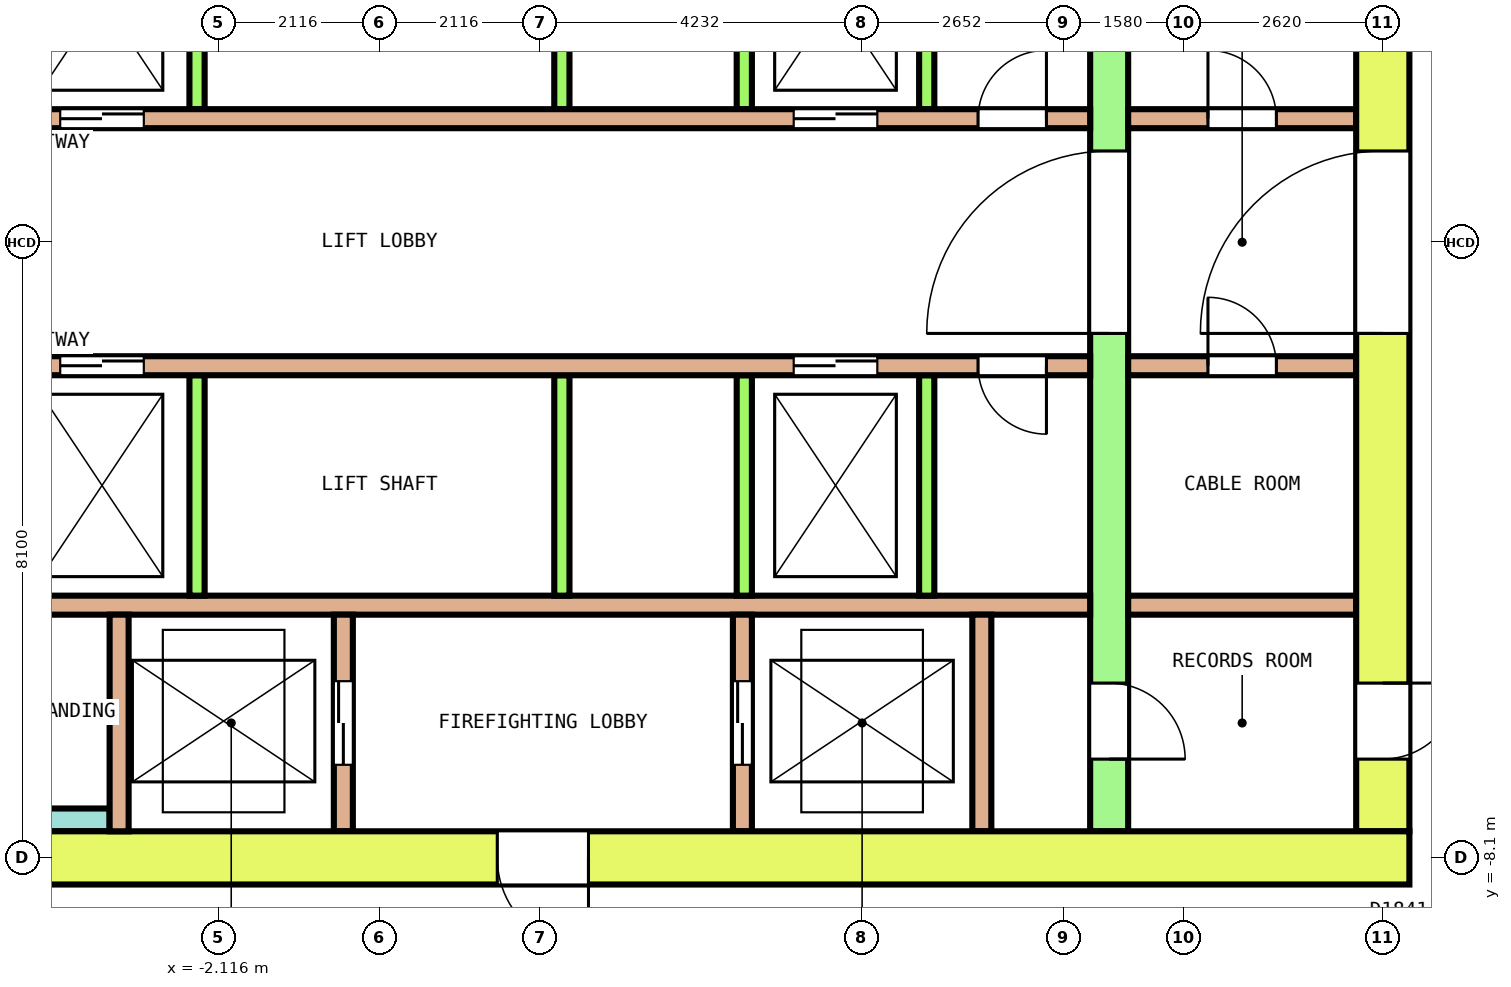
"""IFC4 building model, lengths in metres.
Left out: names, types, materials, properties, quantities, classifications, styles, units other than length and angle.
Written with IfcOpenShell. Run it as: python <this file> out.ifc"""

import sys

from ifc_helpers import new_model, si_unit, direction, frame, frame_2d, origin, place, context, subcontext, project, spatial, rectangle, extrude, element, fill, save


model = new_model("IFC4")
c1 = context("Model", 3, precision=1e-05, world=origin(), true_north=direction((0.0, 1.0)))
c2 = subcontext(c1, "Body", "Model", "MODEL_VIEW")
j1 = project(units=[si_unit("LENGTHUNIT", "METRE"), si_unit("PLANEANGLEUNIT", "RADIAN")], contexts=[c1])
p1 = place(None, origin())
s1 = spatial("IfcSite", under=j1, at=p1, CompositionType="ELEMENT")
p2 = place(p1, origin())
s2 = spatial("IfcBuilding", under=s1, at=p2, CompositionType="ELEMENT")
p3 = place(p2, frame((0.0, 0.0, 176.0)))
s3 = spatial("IfcBuildingStorey", under=s2, at=p3, CompositionType="ELEMENT", Elevation=176.0)
p4 = place(p3, frame((-13.55, -8.1, 0.0), z_axis=(0.0, 0.0, 1.0), x_axis=(1.0, 0.0, 0.0)))
e1 = element("IfcWall", 1, at=p4, inside=s3, PredefinedType="SHEAR", context=c2, shape_type="SweptSolid", body=[
    extrude(rectangle(XDim=27.1, YDim=0.7, at=frame_2d((13.55, 0.0))), origin(), (0.0, 0.0, 1.0), 4.1),
])
p5 = place(p4, frame((15.1, 0.0, 0.0)))
e2 = element("IfcOpeningElement", 2, at=p5, cuts=e1, PredefinedType="OPENING", context=c2, shape_type="SweptSolid", body=[
    extrude(rectangle(XDim=1.2, YDim=2.1, at=frame_2d((0.6, 1.05))), frame((0.0, 0.36, 0.0), z_axis=(0.0, -1.0, 0.0), x_axis=(1.0, 0.0, 0.0)), (0.0, 0.0, 1.0), 0.72),
])
p6 = place(p3, frame((13.2, -7.75, 0.0), z_axis=(0.0, 0.0, 1.0), x_axis=(0.0, 1.0, 0.0)))
e3 = element("IfcWall", 3, at=p6, inside=s3, PredefinedType="SHEAR", context=c2, shape_type="SweptSolid", body=[
    extrude(rectangle(XDim=15.5, YDim=0.7, at=frame_2d((7.75, 0.0))), origin(), (0.0, 0.0, 1.0), 4.1),
])
p7 = place(p6, frame((6.55, 0.0, 0.0)))
e4 = element("IfcOpeningElement", 4, at=p7, cuts=e3, PredefinedType="OPENING", context=c2, shape_type="SweptSolid", body=[
    extrude(rectangle(XDim=2.4, YDim=2.1, at=frame_2d((1.2, 1.05))), frame((0.0, 0.36, 0.0), z_axis=(0.0, -1.0, 0.0), x_axis=(1.0, 0.0, 0.0)), (0.0, 0.0, 1.0), 0.72),
])
p8 = place(p6, frame((13.45, 0.0, 0.0)))
e5 = element("IfcOpeningElement", 5, at=p8, cuts=e3, PredefinedType="OPENING", context=c2, shape_type="SweptSolid", body=[
    extrude(rectangle(XDim=1.2, YDim=2.1, at=frame_2d((0.6, 1.05))), frame((0.0, 0.36, 0.0), z_axis=(0.0, -1.0, 0.0), x_axis=(1.0, 0.0, 0.0)), (0.0, 0.0, 1.0), 0.72),
])
p9 = place(p6, frame((0.95, 0.0, 0.0)))
e6 = element("IfcOpeningElement", 6, at=p9, cuts=e3, PredefinedType="OPENING", context=c2, shape_type="SweptSolid", body=[
    extrude(rectangle(XDim=1.0, YDim=2.1, at=frame_2d((0.5, 1.05))), frame((0.0, 0.36, 0.0), z_axis=(0.0, -1.0, 0.0), x_axis=(1.0, 0.0, 0.0)), (0.0, 0.0, 1.0), 0.72),
])
p10 = place(p3, frame((9.6, -7.75, 0.0), z_axis=(0.0, 0.0, 1.0), x_axis=(0.0, 1.0, 0.0)))
e7 = element("IfcWall", 7, at=p10, inside=s3, PredefinedType="SHEAR", context=c2, shape_type="SweptSolid", body=[
    extrude(rectangle(XDim=15.5, YDim=0.5, at=frame_2d((7.75, 0.0))), origin(), (0.0, 0.0, 1.0), 4.1),
])
p11 = place(p10, frame((6.55, 0.0, 0.0)))
e8 = element("IfcOpeningElement", 8, at=p11, cuts=e7, PredefinedType="OPENING", context=c2, shape_type="SweptSolid", body=[
    extrude(rectangle(XDim=2.4, YDim=2.1, at=frame_2d((1.2, 1.05))), frame((0.0, 0.26, 0.0), z_axis=(0.0, -1.0, 0.0), x_axis=(1.0, 0.0, 0.0)), (0.0, 0.0, 1.0), 0.52),
])
p12 = place(p10, frame((13.45, 0.0, 0.0)))
e9 = element("IfcOpeningElement", 9, at=p12, cuts=e7, PredefinedType="OPENING", context=c2, shape_type="SweptSolid", body=[
    extrude(rectangle(XDim=1.2, YDim=2.1, at=frame_2d((0.6, 1.05))), frame((0.0, 0.26, 0.0), z_axis=(0.0, -1.0, 0.0), x_axis=(1.0, 0.0, 0.0)), (0.0, 0.0, 1.0), 0.52),
])
p13 = place(p10, frame((0.95, 0.0, 0.0)))
e10 = element("IfcOpeningElement", 10, at=p13, cuts=e7, PredefinedType="OPENING", context=c2, shape_type="SweptSolid", body=[
    extrude(rectangle(XDim=1.0, YDim=2.1, at=frame_2d((0.5, 1.05))), frame((0.0, 0.26, 0.0), z_axis=(0.0, -1.0, 0.0), x_axis=(1.0, 0.0, 0.0)), (0.0, 0.0, 1.0), 0.52),
])
p14 = place(p3, frame((-9.35, 1.625, 0.0), z_axis=(0.0, 0.0, 1.0), x_axis=(1.0, 0.0, 0.0)))
e11 = element("IfcWall", 11, at=p14, inside=s3, PredefinedType="SOLIDWALL", context=c2, shape_type="SweptSolid", body=[
    extrude(rectangle(XDim=18.7, YDim=0.25, at=frame_2d((9.35, 0.0))), origin(), (0.0, 0.0, 1.0), 4.1),
])
p15 = place(p14, frame((2.85, 0.0, 0.0)))
e12 = element("IfcOpeningElement", 12, at=p15, cuts=e11, PredefinedType="OPENING", context=c2, shape_type="SweptSolid", body=[
    extrude(rectangle(XDim=1.1, YDim=2.1, at=frame_2d((0.55, 1.05))), frame((0.0, 0.135, 0.0), z_axis=(0.0, -1.0, 0.0), x_axis=(1.0, 0.0, 0.0)), (0.0, 0.0, 1.0), 0.27),
])
p16 = place(p14, frame((5.15, 0.0, 0.0)))
e13 = element("IfcOpeningElement", 13, at=p16, cuts=e11, PredefinedType="OPENING", context=c2, shape_type="SweptSolid", body=[
    extrude(rectangle(XDim=1.1, YDim=2.1, at=frame_2d((0.55, 1.05))), frame((0.0, 0.135, 0.0), z_axis=(0.0, -1.0, 0.0), x_axis=(1.0, 0.0, 0.0)), (0.0, 0.0, 1.0), 0.27),
])
p17 = place(p14, frame((14.8, 0.0, 0.0)))
e14 = element("IfcOpeningElement", 14, at=p17, cuts=e11, PredefinedType="OPENING", context=c2, shape_type="SweptSolid", body=[
    extrude(rectangle(XDim=1.1, YDim=2.1, at=frame_2d((0.55, 1.05))), frame((0.0, 0.135, 0.0), z_axis=(0.0, -1.0, 0.0), x_axis=(1.0, 0.0, 0.0)), (0.0, 0.0, 1.0), 0.27),
])
p18 = place(p14, frame((0.575, 0.0, 0.0)))
e15 = element("IfcOpeningElement", 15, at=p18, cuts=e11, PredefinedType="OPENING", context=c2, shape_type="SweptSolid", body=[
    extrude(rectangle(XDim=0.9, YDim=2.1, at=frame_2d((0.45, 1.05))), frame((0.0, 0.135, 0.0), z_axis=(0.0, -1.0, 0.0), x_axis=(1.0, 0.0, 0.0)), (0.0, 0.0, 1.0), 0.27),
])
p19 = place(p14, frame((17.225, 0.0, 0.0)))
e16 = element("IfcOpeningElement", 16, at=p19, cuts=e11, PredefinedType="OPENING", context=c2, shape_type="SweptSolid", body=[
    extrude(rectangle(XDim=0.9, YDim=2.1, at=frame_2d((0.45, 1.05))), frame((0.0, 0.135, 0.0), z_axis=(0.0, -1.0, 0.0), x_axis=(1.0, 0.0, 0.0)), (0.0, 0.0, 1.0), 0.27),
])
p20 = place(p3, frame((9.85, 1.625, 0.0), z_axis=(0.0, 0.0, 1.0), x_axis=(1.0, 0.0, 0.0)))
e17 = element("IfcWall", 17, at=p20, inside=s3, PredefinedType="SOLIDWALL", context=c2, shape_type="SweptSolid", body=[
    extrude(rectangle(XDim=3.0, YDim=0.25, at=frame_2d((1.5, 0.0))), origin(), (0.0, 0.0, 1.0), 4.1),
])
p21 = place(p20, frame((1.05, 0.0, 0.0)))
e18 = element("IfcOpeningElement", 18, at=p21, cuts=e17, PredefinedType="OPENING", context=c2, shape_type="SweptSolid", body=[
    extrude(rectangle(XDim=0.9, YDim=2.1, at=frame_2d((0.45, 1.05))), frame((0.0, 0.135, 0.0), z_axis=(0.0, -1.0, 0.0), x_axis=(1.0, 0.0, 0.0)), (0.0, 0.0, 1.0), 0.27),
])
for number, where, z_axis, x_axis in (
    (19, (-2.4, 1.75, 0.0), (0.0, 0.0, 1.0), (0.0, 1.0, 0.0)),
    (20, (2.4, 1.75, 0.0), (0.0, 0.0, 1.0), (0.0, 1.0, 0.0)),
    (21, (4.8, 1.75, 0.0), (0.0, 0.0, 1.0), (0.0, 1.0, 0.0)),
    (22, (7.2, 1.75, 0.0), (0.0, 0.0, 1.0), (0.0, 1.0, 0.0)),
):
    element("IfcWall", number, at=place(p3, frame(where, z_axis=z_axis, x_axis=x_axis)), inside=s3, PredefinedType="SOLIDWALL", context=c2, shape_type="SweptSolid", body=[
        extrude(rectangle(XDim=2.9, YDim=0.2, at=frame_2d((1.45, 0.0))), origin(), (0.0, 0.0, 1.0), 4.1),
    ])
p22 = place(p3, frame((-9.35, -1.625, 0.0), z_axis=(0.0, 0.0, 1.0), x_axis=(1.0, 0.0, 0.0)))
e23 = element("IfcWall", 23, at=p22, inside=s3, PredefinedType="SOLIDWALL", context=c2, shape_type="SweptSolid", body=[
    extrude(rectangle(XDim=18.7, YDim=0.25, at=frame_2d((9.35, 0.0))), origin(), (0.0, 0.0, 1.0), 4.1),
])
p23 = place(p22, frame((2.85, 0.0, 0.0)))
e24 = element("IfcOpeningElement", 24, at=p23, cuts=e23, PredefinedType="OPENING", context=c2, shape_type="SweptSolid", body=[
    extrude(rectangle(XDim=1.1, YDim=2.1, at=frame_2d((0.55, 1.05))), frame((0.0, 0.135, 0.0), z_axis=(0.0, -1.0, 0.0), x_axis=(1.0, 0.0, 0.0)), (0.0, 0.0, 1.0), 0.27),
])
p24 = place(p22, frame((5.15, 0.0, 0.0)))
e25 = element("IfcOpeningElement", 25, at=p24, cuts=e23, PredefinedType="OPENING", context=c2, shape_type="SweptSolid", body=[
    extrude(rectangle(XDim=1.1, YDim=2.1, at=frame_2d((0.55, 1.05))), frame((0.0, 0.135, 0.0), z_axis=(0.0, -1.0, 0.0), x_axis=(1.0, 0.0, 0.0)), (0.0, 0.0, 1.0), 0.27),
])
p25 = place(p22, frame((14.8, 0.0, 0.0)))
e26 = element("IfcOpeningElement", 26, at=p25, cuts=e23, PredefinedType="OPENING", context=c2, shape_type="SweptSolid", body=[
    extrude(rectangle(XDim=1.1, YDim=2.1, at=frame_2d((0.55, 1.05))), frame((0.0, 0.135, 0.0), z_axis=(0.0, -1.0, 0.0), x_axis=(1.0, 0.0, 0.0)), (0.0, 0.0, 1.0), 0.27),
])
p26 = place(p22, frame((0.575, 0.0, 0.0)))
e27 = element("IfcOpeningElement", 27, at=p26, cuts=e23, PredefinedType="OPENING", context=c2, shape_type="SweptSolid", body=[
    extrude(rectangle(XDim=0.9, YDim=2.1, at=frame_2d((0.45, 1.05))), frame((0.0, 0.135, 0.0), z_axis=(0.0, -1.0, 0.0), x_axis=(1.0, 0.0, 0.0)), (0.0, 0.0, 1.0), 0.27),
])
p27 = place(p22, frame((17.225, 0.0, 0.0)))
e28 = element("IfcOpeningElement", 28, at=p27, cuts=e23, PredefinedType="OPENING", context=c2, shape_type="SweptSolid", body=[
    extrude(rectangle(XDim=0.9, YDim=2.1, at=frame_2d((0.45, 1.05))), frame((0.0, 0.135, 0.0), z_axis=(0.0, -1.0, 0.0), x_axis=(1.0, 0.0, 0.0)), (0.0, 0.0, 1.0), 0.27),
])
p28 = place(p3, frame((9.85, -1.625, 0.0), z_axis=(0.0, 0.0, 1.0), x_axis=(1.0, 0.0, 0.0)))
e29 = element("IfcWall", 29, at=p28, inside=s3, PredefinedType="SOLIDWALL", context=c2, shape_type="SweptSolid", body=[
    extrude(rectangle(XDim=3.0, YDim=0.25, at=frame_2d((1.5, 0.0))), origin(), (0.0, 0.0, 1.0), 4.1),
])
p29 = place(p28, frame((1.05, 0.0, 0.0)))
e30 = element("IfcOpeningElement", 30, at=p29, cuts=e29, PredefinedType="OPENING", context=c2, shape_type="SweptSolid", body=[
    extrude(rectangle(XDim=0.9, YDim=2.1, at=frame_2d((0.45, 1.05))), frame((0.0, 0.135, 0.0), z_axis=(0.0, -1.0, 0.0), x_axis=(1.0, 0.0, 0.0)), (0.0, 0.0, 1.0), 0.27),
])
p30 = place(p3, frame((-9.35, -4.775, 0.0), z_axis=(0.0, 0.0, 1.0), x_axis=(1.0, 0.0, 0.0)))
e31 = element("IfcWall", 31, at=p30, inside=s3, PredefinedType="SOLIDWALL", context=c2, shape_type="SweptSolid", body=[
    extrude(rectangle(XDim=18.7, YDim=0.25, at=frame_2d((9.35, 0.0))), origin(), (0.0, 0.0, 1.0), 4.1),
])
p31 = place(p3, frame((9.85, -4.775, 0.0), z_axis=(0.0, 0.0, 1.0), x_axis=(1.0, 0.0, 0.0)))
e32 = element("IfcWall", 32, at=p31, inside=s3, PredefinedType="SOLIDWALL", context=c2, shape_type="SweptSolid", body=[
    extrude(rectangle(XDim=3.0, YDim=0.25, at=frame_2d((1.5, 0.0))), origin(), (0.0, 0.0, 1.0), 4.1),
])
for number, where, z_axis, x_axis in (
    (33, (-2.4, -4.65, 0.0), (0.0, 0.0, 1.0), (0.0, 1.0, 0.0)),
    (34, (2.4, -4.65, 0.0), (0.0, 0.0, 1.0), (0.0, 1.0, 0.0)),
    (35, (4.8, -4.65, 0.0), (0.0, 0.0, 1.0), (0.0, 1.0, 0.0)),
    (36, (7.2, -4.65, 0.0), (0.0, 0.0, 1.0), (0.0, 1.0, 0.0)),
):
    element("IfcWall", number, at=place(p3, frame(where, z_axis=z_axis, x_axis=x_axis)), inside=s3, PredefinedType="SOLIDWALL", context=c2, shape_type="SweptSolid", body=[
        extrude(rectangle(XDim=2.9, YDim=0.2, at=frame_2d((1.45, 0.0))), origin(), (0.0, 0.0, 1.0), 4.1),
    ])
p32 = place(p3, frame((-9.35, -7.6, 0.0), z_axis=(0.0, 0.0, 1.0), x_axis=(1.0, 0.0, 0.0)))
e37 = element("IfcWall", 37, at=p32, inside=s3, PredefinedType="SOLIDWALL", context=c2, shape_type="SweptSolid", body=[
    extrude(rectangle(XDim=5.8, YDim=0.3, at=frame_2d((2.9, 0.0))), origin(), (0.0, 0.0, 1.0), 4.1),
])
p33 = place(p3, frame((-3.425, -7.75, 0.0), z_axis=(0.0, 0.0, 1.0), x_axis=(0.0, 1.0, 0.0)))
e38 = element("IfcWall", 38, at=p33, inside=s3, PredefinedType="SOLIDWALL", context=c2, shape_type="SweptSolid", body=[
    extrude(rectangle(XDim=2.85, YDim=0.25, at=frame_2d((1.425, 0.0))), origin(), (0.0, 0.0, 1.0), 4.1),
])
p34 = place(p3, frame((-0.475, -7.75, 0.0), z_axis=(0.0, 0.0, 1.0), x_axis=(0.0, 1.0, 0.0)))
e39 = element("IfcWall", 39, at=p34, inside=s3, PredefinedType="SOLIDWALL", context=c2, shape_type="SweptSolid", body=[
    extrude(rectangle(XDim=2.85, YDim=0.25, at=frame_2d((1.425, 0.0))), origin(), (0.0, 0.0, 1.0), 4.1),
])
p35 = place(p34, frame((0.875, 0.0, 0.0)))
e40 = element("IfcOpeningElement", 40, at=p35, cuts=e39, PredefinedType="OPENING", context=c2, shape_type="SweptSolid", body=[
    extrude(rectangle(XDim=1.1, YDim=2.1, at=frame_2d((0.55, 1.05))), frame((0.0, 0.135, 0.0), z_axis=(0.0, -1.0, 0.0), x_axis=(1.0, 0.0, 0.0)), (0.0, 0.0, 1.0), 0.27),
])
p36 = place(p3, frame((4.775, -7.75, 0.0), z_axis=(0.0, 0.0, 1.0), x_axis=(0.0, 1.0, 0.0)))
e41 = element("IfcWall", 41, at=p36, inside=s3, PredefinedType="SOLIDWALL", context=c2, shape_type="SweptSolid", body=[
    extrude(rectangle(XDim=2.85, YDim=0.25, at=frame_2d((1.425, 0.0))), origin(), (0.0, 0.0, 1.0), 4.1),
])
p37 = place(p36, frame((0.875, 0.0, 0.0)))
e42 = element("IfcOpeningElement", 42, at=p37, cuts=e41, PredefinedType="OPENING", context=c2, shape_type="SweptSolid", body=[
    extrude(rectangle(XDim=1.1, YDim=2.1, at=frame_2d((0.55, 1.05))), frame((0.0, 0.135, 0.0), z_axis=(0.0, -1.0, 0.0), x_axis=(1.0, 0.0, 0.0)), (0.0, 0.0, 1.0), 0.27),
])
p38 = place(p3, frame((7.925, -7.75, 0.0), z_axis=(0.0, 0.0, 1.0), x_axis=(0.0, 1.0, 0.0)))
e43 = element("IfcWall", 43, at=p38, inside=s3, PredefinedType="SOLIDWALL", context=c2, shape_type="SweptSolid", body=[
    extrude(rectangle(XDim=2.85, YDim=0.25, at=frame_2d((1.425, 0.0))), origin(), (0.0, 0.0, 1.0), 4.1),
])
p39 = place(p16, origin())
e44 = element("IfcDoor", 44, at=p39, inside=s3, OperationType="DOUBLE_DOOR_SLIDING", PredefinedType="DOOR", context=c2, shape_type="SweptSolid", body=[
    extrude(rectangle(XDim=1.1, YDim=2.1, at=frame_2d((0.55, 1.05))), frame((0.0, 0.075, 0.0), z_axis=(0.0, -1.0, 0.0), x_axis=(1.0, 0.0, 0.0)), (0.0, 0.0, 1.0), 0.15),
])
fill(e13, e44)
p40 = place(p17, origin())
e45 = element("IfcDoor", 45, at=p40, inside=s3, OperationType="DOUBLE_DOOR_SLIDING", PredefinedType="DOOR", context=c2, shape_type="SweptSolid", body=[
    extrude(rectangle(XDim=1.1, YDim=2.1, at=frame_2d((0.55, 1.05))), frame((0.0, 0.075, 0.0), z_axis=(0.0, -1.0, 0.0), x_axis=(1.0, 0.0, 0.0)), (0.0, 0.0, 1.0), 0.15),
])
fill(e14, e45)
p41 = place(p24, origin())
e46 = element("IfcDoor", 46, at=p41, inside=s3, OperationType="DOUBLE_DOOR_SLIDING", PredefinedType="DOOR", context=c2, shape_type="SweptSolid", body=[
    extrude(rectangle(XDim=1.1, YDim=2.1, at=frame_2d((0.55, 1.05))), frame((0.0, 0.075, 0.0), z_axis=(0.0, -1.0, 0.0), x_axis=(1.0, 0.0, 0.0)), (0.0, 0.0, 1.0), 0.15),
])
fill(e25, e46)
p42 = place(p25, origin())
e47 = element("IfcDoor", 47, at=p42, inside=s3, OperationType="DOUBLE_DOOR_SLIDING", PredefinedType="DOOR", context=c2, shape_type="SweptSolid", body=[
    extrude(rectangle(XDim=1.1, YDim=2.1, at=frame_2d((0.55, 1.05))), frame((0.0, 0.075, 0.0), z_axis=(0.0, -1.0, 0.0), x_axis=(1.0, 0.0, 0.0)), (0.0, 0.0, 1.0), 0.15),
])
fill(e26, e47)
p43 = place(p35, origin())
e48 = element("IfcDoor", 48, at=p43, inside=s3, OperationType="DOUBLE_DOOR_SLIDING", PredefinedType="DOOR", context=c2, shape_type="SweptSolid", body=[
    extrude(rectangle(XDim=1.1, YDim=2.1, at=frame_2d((0.55, 1.05))), frame((0.0, 0.075, 0.0), z_axis=(0.0, -1.0, 0.0), x_axis=(1.0, 0.0, 0.0)), (0.0, 0.0, 1.0), 0.15),
])
fill(e40, e48)
p44 = place(p37, origin())
e49 = element("IfcDoor", 49, at=p44, inside=s3, OperationType="DOUBLE_DOOR_SLIDING", PredefinedType="DOOR", context=c2, shape_type="SweptSolid", body=[
    extrude(rectangle(XDim=1.1, YDim=2.1, at=frame_2d((0.55, 1.05))), frame((0.0, 0.075, 0.0), z_axis=(0.0, -1.0, 0.0), x_axis=(1.0, 0.0, 0.0)), (0.0, 0.0, 1.0), 0.15),
])
fill(e42, e49)
p45 = place(p11, origin())
e50 = element("IfcDoor", 50, at=p45, inside=s3, OperationType="DOUBLE_DOOR_SINGLE_SWING", PredefinedType="DOOR", context=c2, shape_type="SweptSolid", body=[
    extrude(rectangle(XDim=2.4, YDim=2.1, at=frame_2d((1.2, 1.05))), frame((0.0, 0.2, 0.0), z_axis=(0.0, -1.0, 0.0), x_axis=(1.0, 0.0, 0.0)), (0.0, 0.0, 1.0), 0.4),
])
fill(e8, e50)
p46 = place(p7, origin())
e51 = element("IfcDoor", 51, at=p46, inside=s3, OperationType="DOUBLE_DOOR_SINGLE_SWING", PredefinedType="DOOR", context=c2, shape_type="SweptSolid", body=[
    extrude(rectangle(XDim=2.4, YDim=2.1, at=frame_2d((1.2, 1.05))), frame((0.0, 0.3, 0.0), z_axis=(0.0, -1.0, 0.0), x_axis=(1.0, 0.0, 0.0)), (0.0, 0.0, 1.0), 0.6),
])
fill(e4, e51)
p47 = place(p5, origin())
e52 = element("IfcDoor", 52, at=p47, inside=s3, OperationType="SINGLE_SWING_LEFT", PredefinedType="DOOR", context=c2, shape_type="SweptSolid", body=[
    extrude(rectangle(XDim=1.2, YDim=2.1, at=frame_2d((0.6, 1.05))), frame((0.0, 0.3, 0.0), z_axis=(0.0, -1.0, 0.0), x_axis=(1.0, 0.0, 0.0)), (0.0, 0.0, 1.0), 0.6),
])
fill(e2, e52)
p48 = place(p13, origin())
e53 = element("IfcDoor", 53, at=p48, inside=s3, OperationType="SINGLE_SWING_LEFT", PredefinedType="DOOR", context=c2, shape_type="SweptSolid", body=[
    extrude(rectangle(XDim=1.0, YDim=2.1, at=frame_2d((0.5, 1.05))), frame((0.0, 0.2, 0.0), z_axis=(0.0, -1.0, 0.0), x_axis=(1.0, 0.0, 0.0)), (0.0, 0.0, 1.0), 0.4),
])
fill(e10, e53)
p49 = place(p9, origin())
e54 = element("IfcDoor", 54, at=p49, inside=s3, OperationType="SINGLE_SWING_RIGHT", PredefinedType="DOOR", context=c2, shape_type="SweptSolid", body=[
    extrude(rectangle(XDim=1.0, YDim=2.1, at=frame_2d((0.5, 1.05))), frame((0.0, 0.3, 0.0), z_axis=(0.0, -1.0, 0.0), x_axis=(1.0, 0.0, 0.0)), (0.0, 0.0, 1.0), 0.6),
])
fill(e6, e54)
p50 = place(p19, origin())
e55 = element("IfcDoor", 55, at=p50, inside=s3, OperationType="SINGLE_SWING_LEFT", PredefinedType="DOOR", context=c2, shape_type="SweptSolid", body=[
    extrude(rectangle(XDim=0.9, YDim=2.1, at=frame_2d((0.45, 1.05))), frame((0.0, 0.075, 0.0), z_axis=(0.0, -1.0, 0.0), x_axis=(1.0, 0.0, 0.0)), (0.0, 0.0, 1.0), 0.15),
])
fill(e16, e55)
p51 = place(p21, origin())
e56 = element("IfcDoor", 56, at=p51, inside=s3, OperationType="SINGLE_SWING_RIGHT", PredefinedType="DOOR", context=c2, shape_type="SweptSolid", body=[
    extrude(rectangle(XDim=0.9, YDim=2.1, at=frame_2d((0.45, 1.05))), frame((0.0, 0.075, 0.0), z_axis=(0.0, -1.0, 0.0), x_axis=(1.0, 0.0, 0.0)), (0.0, 0.0, 1.0), 0.15),
])
fill(e18, e56)
p52 = place(p27, origin())
e57 = element("IfcDoor", 57, at=p52, inside=s3, OperationType="SINGLE_SWING_LEFT", PredefinedType="DOOR", context=c2, shape_type="SweptSolid", body=[
    extrude(rectangle(XDim=0.9, YDim=2.1, at=frame_2d((0.45, 1.05))), frame((0.0, 0.075, 0.0), z_axis=(0.0, -1.0, 0.0), x_axis=(1.0, 0.0, 0.0)), (0.0, 0.0, 1.0), 0.15),
])
fill(e28, e57)
p53 = place(p29, origin())
e58 = element("IfcDoor", 58, at=p53, inside=s3, OperationType="SINGLE_SWING_RIGHT", PredefinedType="DOOR", context=c2, shape_type="SweptSolid", body=[
    extrude(rectangle(XDim=0.9, YDim=2.1, at=frame_2d((0.45, 1.05))), frame((0.0, 0.075, 0.0), z_axis=(0.0, -1.0, 0.0), x_axis=(1.0, 0.0, 0.0)), (0.0, 0.0, 1.0), 0.15),
])
fill(e30, e58)
save(model, sys.argv[1])
